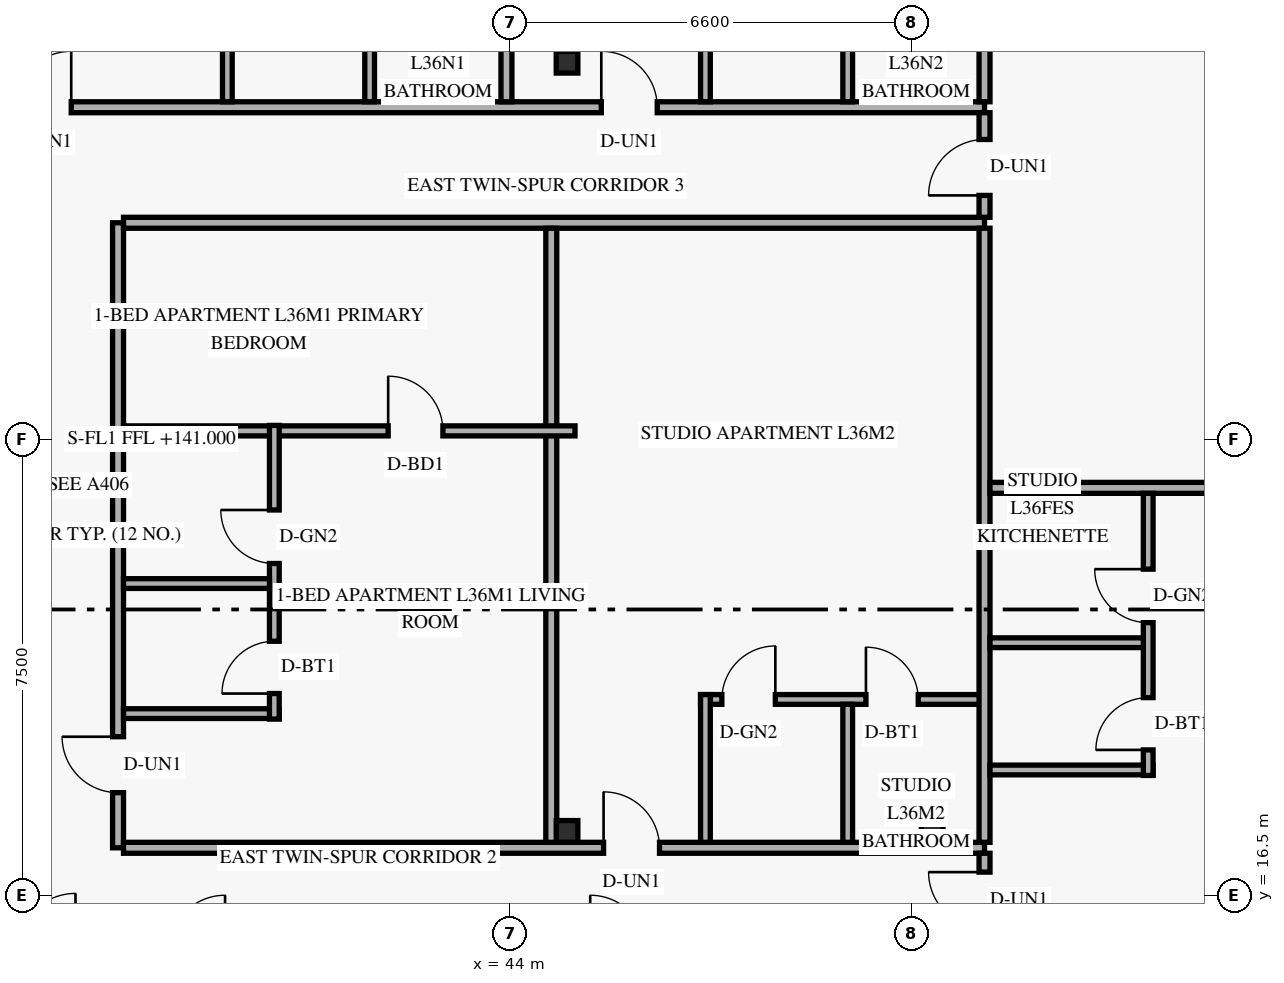
"""IFC4 building model, lengths in metres.
Left out: names, types, materials, properties, quantities, classifications, styles, units other than length and angle.
Written with IfcOpenShell. Run it as: python <this file> out.ifc"""

import sys

from ifc_helpers import new_model, si_unit, direction, frame, frame_2d, origin, origin_2d, place, context, subcontext, project, spatial, rectangle, hollow_rectangle, extrude, element, fill, save


model = new_model("IFC4")
c1 = context("Model", 3, precision=1e-05, world=origin(), true_north=direction((0.0, 1.0)))
c2 = subcontext(c1, "Body", "Model", "MODEL_VIEW")
j1 = project(units=[si_unit("LENGTHUNIT", "METRE"), si_unit("PLANEANGLEUNIT", "RADIAN")], contexts=[c1])
p1 = place(None, origin())
s1 = spatial("IfcSite", under=j1, at=p1, CompositionType="ELEMENT")
p2 = place(p1, origin())
s2 = spatial("IfcBuilding", under=s1, at=p2, CompositionType="ELEMENT")
p3 = place(p2, frame((0.0, 0.0, 141.0)))
s3 = spatial("IfcBuildingStorey", under=s2, at=p3, CompositionType="ELEMENT", Elevation=141.0)
for number, where, z_axis, x_axis in (
    (1, (44.871, 17.55, 0.0), (0.035, 0.0, 0.999), (0.0, 1.0, 0.0)),
    (2, (44.871, 30.2, 0.0), (0.035, 0.0, 0.999), (0.0, 1.0, 0.0)),
):
    element("IfcColumn", number, at=place(p3, frame(where, z_axis=z_axis, x_axis=x_axis)), inside=s3, PredefinedType="COLUMN", context=c2, shape_type="SweptSolid", body=[
        extrude(hollow_rectangle(XDim=0.356, YDim=0.356, WallThickness=0.016, at=origin_2d()), origin(), (0.0, 0.0, 1.0), 3.602),
    ])
for number, where, z_axis, x_axis in (
    (3, (50.835, 17.55, 0.0), (0.058, 0.0, 0.998), (0.0, 1.0, 0.0)),
    (4, (50.835, 30.2, 0.0), (0.058, 0.0, 0.998), (0.0, 1.0, 0.0)),
):
    element("IfcColumn", number, at=place(p3, frame(where, z_axis=z_axis, x_axis=x_axis)), inside=s3, PredefinedType="COLUMN", context=c2, shape_type="SweptSolid", body=[
        extrude(hollow_rectangle(XDim=0.356, YDim=0.356, WallThickness=0.016, at=origin_2d()), origin(), (0.0, 0.0, 1.0), 3.606),
    ])
p4 = place(p3, frame((37.55, 17.28, 0.0), z_axis=(0.0, 0.0, 1.0), x_axis=(0.0, 1.0, 0.0)))
e5 = element("IfcWall", 5, at=p4, inside=s3, PredefinedType="STANDARD", context=c2, shape_type="SweptSolid", body=[
    extrude(rectangle(XDim=10.28, YDim=0.18, at=frame_2d((5.14, 0.0))), origin(), (0.0, 0.0, 1.0), 2.73),
])
p5 = place(p4, frame((0.907, 0.0, 0.0)))
e6 = element("IfcOpeningElement", 6, at=p5, cuts=e5, PredefinedType="OPENING", context=c2, shape_type="SweptSolid", body=[
    extrude(rectangle(XDim=0.92, YDim=2.15, at=frame_2d((0.46, 1.075))), frame((0.0, 0.1, 0.0), z_axis=(0.0, -1.0, 0.0), x_axis=(1.0, 0.0, 0.0)), (0.0, 0.0, 1.0), 0.2),
])
p6 = place(p3, frame((37.64, 17.28, 0.0), z_axis=(0.0, 0.0, 1.0), x_axis=(1.0, 0.0, 0.0)))
e7 = element("IfcWall", 7, at=p6, inside=s3, PredefinedType="STANDARD", context=c2, shape_type="SweptSolid", body=[
    extrude(rectangle(XDim=14.16, YDim=0.18, at=frame_2d((7.08, 0.0))), origin(), (0.0, 0.0, 1.0), 2.73),
])
p7 = place(p6, frame((7.895, 0.0, 0.0)))
e8 = element("IfcOpeningElement", 8, at=p7, cuts=e7, PredefinedType="OPENING", context=c2, shape_type="SweptSolid", body=[
    extrude(rectangle(XDim=0.92, YDim=2.15, at=frame_2d((0.46, 1.075))), frame((0.0, 0.1, 0.0), z_axis=(0.0, -1.0, 0.0), x_axis=(1.0, 0.0, 0.0)), (0.0, 0.0, 1.0), 0.2),
])
p8 = place(p3, frame((37.64, 27.56, 0.0), z_axis=(0.0, 0.0, 1.0), x_axis=(1.0, 0.0, 0.0)))
e9 = element("IfcWall", 9, at=p8, inside=s3, PredefinedType="STANDARD", context=c2, shape_type="SweptSolid", body=[
    extrude(rectangle(XDim=14.16, YDim=0.18, at=frame_2d((7.08, 0.0))), origin(), (0.0, 0.0, 1.0), 2.73),
])
p9 = place(p3, frame((35.51, 29.46, 0.0), z_axis=(0.0, 0.0, 1.0), x_axis=(1.0, 0.0, 0.0)))
e10 = element("IfcWall", 10, at=p9, inside=s3, PredefinedType="STANDARD", context=c2, shape_type="SweptSolid", body=[
    extrude(rectangle(XDim=16.29, YDim=0.18, at=frame_2d((8.145, 0.0))), origin(), (0.0, 0.0, 1.0), 2.73),
])
p10 = place(p9, frame((0.35, 0.0, 0.0)))
e11 = element("IfcOpeningElement", 11, at=p10, cuts=e10, PredefinedType="OPENING", context=c2, shape_type="SweptSolid", body=[
    extrude(rectangle(XDim=0.92, YDim=2.15, at=frame_2d((0.46, 1.075))), frame((0.0, 0.1, 0.0), z_axis=(0.0, -1.0, 0.0), x_axis=(1.0, 0.0, 0.0)), (0.0, 0.0, 1.0), 0.2),
])
p11 = place(p9, frame((9.988, 0.0, 0.0)))
e12 = element("IfcOpeningElement", 12, at=p11, cuts=e10, PredefinedType="OPENING", context=c2, shape_type="SweptSolid", body=[
    extrude(rectangle(XDim=0.92, YDim=2.15, at=frame_2d((0.46, 1.075))), frame((0.0, 0.1, 0.0), z_axis=(0.0, -1.0, 0.0), x_axis=(1.0, 0.0, 0.0)), (0.0, 0.0, 1.0), 0.2),
])
p12 = place(p3, frame((43.938, 29.55, 0.0), z_axis=(0.0, 0.0, 1.0), x_axis=(0.0, 1.0, 0.0)))
e13 = element("IfcWall", 13, at=p12, inside=s3, PredefinedType="PARTITIONING", context=c2, shape_type="SweptSolid", body=[
    extrude(rectangle(XDim=14.17, YDim=0.18, at=frame_2d((7.085, 0.0))), origin(), (0.0, 0.0, 1.0), 2.73),
])
p13 = place(p3, frame((39.348, 29.55, 0.0), z_axis=(0.0, 0.0, 1.0), x_axis=(0.0, 1.0, 0.0)))
e14 = element("IfcWall", 14, at=p13, inside=s3, PredefinedType="PLUMBINGWALL", context=c2, shape_type="SweptSolid", body=[
    extrude(rectangle(XDim=2.76, YDim=0.16, at=frame_2d((1.38, 0.0))), origin(), (0.0, 0.0, 1.0), 2.73),
])
p14 = place(p3, frame((41.688, 29.55, 0.0), z_axis=(0.0, 0.0, 1.0), x_axis=(0.0, 1.0, 0.0)))
e15 = element("IfcWall", 15, at=p14, inside=s3, PredefinedType="PLUMBINGWALL", context=c2, shape_type="SweptSolid", body=[
    extrude(rectangle(XDim=2.6, YDim=0.16, at=frame_2d((1.3, 0.0))), origin(), (0.0, 0.0, 1.0), 2.73),
])
p15 = place(p3, frame((47.21, 29.55, 0.0), z_axis=(0.0, 0.0, 1.0), x_axis=(0.0, 1.0, 0.0)))
e16 = element("IfcWall", 16, at=p15, inside=s3, PredefinedType="PLUMBINGWALL", context=c2, shape_type="SweptSolid", body=[
    extrude(rectangle(XDim=2.76, YDim=0.16, at=frame_2d((1.38, 0.0))), origin(), (0.0, 0.0, 1.0), 2.73),
])
p16 = place(p3, frame((49.55, 29.55, 0.0), z_axis=(0.0, 0.0, 1.0), x_axis=(0.0, 1.0, 0.0)))
e17 = element("IfcWall", 17, at=p16, inside=s3, PredefinedType="PLUMBINGWALL", context=c2, shape_type="SweptSolid", body=[
    extrude(rectangle(XDim=2.6, YDim=0.16, at=frame_2d((1.3, 0.0))), origin(), (0.0, 0.0, 1.0), 2.73),
])
p17 = place(p3, frame((44.675, 17.37, 0.0), z_axis=(0.0, 0.0, 1.0), x_axis=(0.0, 1.0, 0.0)))
e18 = element("IfcWall", 18, at=p17, inside=s3, PredefinedType="PARTITIONING", context=c2, shape_type="SweptSolid", body=[
    extrude(rectangle(XDim=10.1, YDim=0.18, at=frame_2d((5.05, 0.0))), origin(), (0.0, 0.0, 1.0), 2.73),
])
p18 = place(p3, frame((37.64, 24.137, 0.0), z_axis=(0.0, 0.0, 1.0), x_axis=(1.0, 0.0, 0.0)))
e19 = element("IfcWall", 19, at=p18, inside=s3, PredefinedType="PARTITIONING", context=c2, shape_type="SweptSolid", body=[
    extrude(rectangle(XDim=7.425, YDim=0.165, at=frame_2d((3.712, 0.0))), origin(), (0.0, 0.0, 1.0), 2.73),
])
p19 = place(p18, frame((4.353, 0.0, 0.0)))
e20 = element("IfcOpeningElement", 20, at=p19, cuts=e19, PredefinedType="OPENING", context=c2, shape_type="SweptSolid", body=[
    extrude(rectangle(XDim=0.9, YDim=2.14, at=frame_2d((0.45, 1.07))), frame((0.0, 0.093, 0.0), z_axis=(0.0, -1.0, 0.0), x_axis=(1.0, 0.0, 0.0)), (0.0, 0.0, 1.0), 0.185),
])
p20 = place(p3, frame((37.64, 19.487, 0.0), z_axis=(0.0, 0.0, 1.0), x_axis=(1.0, 0.0, 0.0)))
e21 = element("IfcWall", 21, at=p20, inside=s3, PredefinedType="PLUMBINGWALL", context=c2, shape_type="SweptSolid", body=[
    extrude(rectangle(XDim=2.56, YDim=0.16, at=frame_2d((1.28, 0.0))), origin(), (0.0, 0.0, 1.0), 3.36),
])
p21 = place(p3, frame((40.12, 19.397, 0.0), z_axis=(0.0, 0.0, 1.0), x_axis=(0.0, 1.0, 0.0)))
e22 = element("IfcWall", 22, at=p21, inside=s3, PredefinedType="PLUMBINGWALL", context=c2, shape_type="SweptSolid", body=[
    extrude(rectangle(XDim=4.83, YDim=0.16, at=frame_2d((2.415, 0.0))), origin(), (0.0, 0.0, 1.0), 3.36),
])
p22 = place(p21, frame((0.42, 0.0, 0.0)))
e23 = element("IfcOpeningElement", 23, at=p22, cuts=e22, PredefinedType="OPENING", context=c2, shape_type="SweptSolid", body=[
    extrude(rectangle(XDim=0.86, YDim=2.12, at=frame_2d((0.43, 1.06))), frame((0.0, 0.09, 0.0), z_axis=(0.0, -1.0, 0.0), x_axis=(1.0, 0.0, 0.0)), (0.0, 0.0, 1.0), 0.18),
])
p23 = place(p21, frame((2.559, 0.0, 0.0)))
e24 = element("IfcOpeningElement", 24, at=p23, cuts=e22, PredefinedType="OPENING", context=c2, shape_type="SweptSolid", body=[
    extrude(rectangle(XDim=0.88, YDim=2.12, at=frame_2d((0.44, 1.06))), frame((0.0, 0.09, 0.0), z_axis=(0.0, -1.0, 0.0), x_axis=(1.0, 0.0, 0.0)), (0.0, 0.0, 1.0), 0.18),
])
p24 = place(p3, frame((37.64, 21.626, 0.0), z_axis=(0.0, 0.0, 1.0), x_axis=(1.0, 0.0, 0.0)))
e25 = element("IfcWall", 25, at=p24, inside=s3, PredefinedType="PLUMBINGWALL", context=c2, shape_type="SweptSolid", body=[
    extrude(rectangle(XDim=2.4, YDim=0.16, at=frame_2d((1.2, 0.0))), origin(), (0.0, 0.0, 1.0), 3.36),
])
p25 = place(p3, frame((47.13, 19.72, 0.0), z_axis=(0.0, 0.0, 1.0), x_axis=(1.0, 0.0, 0.0)))
e26 = element("IfcWall", 26, at=p25, inside=s3, PredefinedType="PLUMBINGWALL", context=c2, shape_type="SweptSolid", body=[
    extrude(rectangle(XDim=4.67, YDim=0.16, at=frame_2d((2.335, 0.0))), origin(), (0.0, 0.0, 1.0), 2.879),
])
p26 = place(p25, frame((0.35, 0.0, 0.0)))
e27 = element("IfcOpeningElement", 27, at=p26, cuts=e26, PredefinedType="OPENING", context=c2, shape_type="SweptSolid", body=[
    extrude(rectangle(XDim=0.88, YDim=2.12, at=frame_2d((0.44, 1.06))), frame((0.0, 0.09, 0.0), z_axis=(0.0, -1.0, 0.0), x_axis=(1.0, 0.0, 0.0)), (0.0, 0.0, 1.0), 0.18),
])
p27 = place(p25, frame((2.72, 0.0, 0.0)))
e28 = element("IfcOpeningElement", 28, at=p27, cuts=e26, PredefinedType="OPENING", context=c2, shape_type="SweptSolid", body=[
    extrude(rectangle(XDim=0.86, YDim=2.12, at=frame_2d((0.43, 1.06))), frame((0.0, 0.09, 0.0), z_axis=(0.0, -1.0, 0.0), x_axis=(1.0, 0.0, 0.0)), (0.0, 0.0, 1.0), 0.18),
])
p28 = place(p3, frame((47.21, 17.37, 0.0), z_axis=(0.0, 0.0, 1.0), x_axis=(0.0, 1.0, 0.0)))
e29 = element("IfcWall", 29, at=p28, inside=s3, PredefinedType="PLUMBINGWALL", context=c2, shape_type="SweptSolid", body=[
    extrude(rectangle(XDim=2.43, YDim=0.16, at=frame_2d((1.215, 0.0))), origin(), (0.0, 0.0, 1.0), 2.73),
])
p29 = place(p3, frame((49.55, 17.37, 0.0), z_axis=(0.0, 0.0, 1.0), x_axis=(0.0, 1.0, 0.0)))
e30 = element("IfcWall", 30, at=p29, inside=s3, PredefinedType="PLUMBINGWALL", context=c2, shape_type="SweptSolid", body=[
    extrude(rectangle(XDim=2.27, YDim=0.16, at=frame_2d((1.135, 0.0))), origin(), (0.0, 0.0, 1.0), 2.73),
])
p30 = place(p3, frame((51.8, 15.67, 0.0), z_axis=(0.0, 0.0, 1.0), x_axis=(0.0, 1.0, 0.0)))
e31 = element("IfcWall", 31, at=p30, inside=s3, PredefinedType="STANDARD", context=c2, shape_type="SweptSolid", body=[
    extrude(rectangle(XDim=1.52, YDim=0.18, at=frame_2d((0.76, 0.0))), origin(), (0.0, 0.0, 1.0), 3.36),
])
p31 = place(p30, frame((0.29, 0.0, 0.0)))
e32 = element("IfcOpeningElement", 32, at=p31, cuts=e31, PredefinedType="OPENING", context=c2, shape_type="SweptSolid", body=[
    extrude(rectangle(XDim=0.92, YDim=2.15, at=frame_2d((0.46, 1.075))), frame((0.0, 0.1, 0.0), z_axis=(0.0, -1.0, 0.0), x_axis=(1.0, 0.0, 0.0)), (0.0, 0.0, 1.0), 0.2),
])
p32 = place(p3, frame((51.8, 27.65, 0.0), z_axis=(0.0, 0.0, 1.0), x_axis=(0.0, 1.0, 0.0)))
e33 = element("IfcWall", 33, at=p32, inside=s3, PredefinedType="STANDARD", context=c2, shape_type="SweptSolid", body=[
    extrude(rectangle(XDim=1.72, YDim=0.18, at=frame_2d((0.86, 0.0))), origin(), (0.0, 0.0, 1.0), 3.36),
])
p33 = place(p32, frame((0.36, 0.0, 0.0)))
e34 = element("IfcOpeningElement", 34, at=p33, cuts=e33, PredefinedType="OPENING", context=c2, shape_type="SweptSolid", body=[
    extrude(rectangle(XDim=0.92, YDim=2.15, at=frame_2d((0.46, 1.075))), frame((0.0, 0.1, 0.0), z_axis=(0.0, -1.0, 0.0), x_axis=(1.0, 0.0, 0.0)), (0.0, 0.0, 1.0), 0.2),
])
p34 = place(p3, frame((51.8, 17.37, 0.0), z_axis=(0.0, 0.0, 1.0), x_axis=(0.0, 1.0, 0.0)))
e35 = element("IfcWall", 35, at=p34, inside=s3, PredefinedType="PARTITIONING", context=c2, shape_type="SweptSolid", body=[
    extrude(rectangle(XDim=10.1, YDim=0.18, at=frame_2d((5.05, 0.0))), origin(), (0.0, 0.0, 1.0), 3.36),
])
p35 = place(p3, frame((51.8, 29.55, 0.0), z_axis=(0.0, 0.0, 1.0), x_axis=(0.0, 1.0, 0.0)))
e36 = element("IfcWall", 36, at=p35, inside=s3, PredefinedType="PARTITIONING", context=c2, shape_type="SweptSolid", body=[
    extrude(rectangle(XDim=14.17, YDim=0.18, at=frame_2d((7.085, 0.0))), origin(), (0.0, 0.0, 1.0), 3.36),
])
p36 = place(p3, frame((51.89, 23.2, 0.0), z_axis=(0.0, 0.0, 1.0), x_axis=(1.0, 0.0, 0.0)))
e37 = element("IfcWall", 37, at=p36, inside=s3, PredefinedType="PARTITIONING", context=c2, shape_type="SweptSolid", body=[
    extrude(rectangle(XDim=6.43, YDim=0.18, at=frame_2d((3.215, 0.0))), origin(), (0.0, 0.0, 1.0), 3.36),
])
p37 = place(p3, frame((51.89, 18.56, 0.0), z_axis=(0.0, 0.0, 1.0), x_axis=(1.0, 0.0, 0.0)))
e38 = element("IfcWall", 38, at=p37, inside=s3, PredefinedType="PLUMBINGWALL", context=c2, shape_type="SweptSolid", body=[
    extrude(rectangle(XDim=2.682, YDim=0.16, at=frame_2d((1.341, 0.0))), origin(), (0.0, 0.0, 1.0), 3.36),
])
p38 = place(p3, frame((54.492, 18.47, 0.0), z_axis=(0.0, 0.0, 1.0), x_axis=(0.0, 1.0, 0.0)))
e39 = element("IfcWall", 39, at=p38, inside=s3, PredefinedType="PLUMBINGWALL", context=c2, shape_type="SweptSolid", body=[
    extrude(rectangle(XDim=4.64, YDim=0.16, at=frame_2d((2.32, 0.0))), origin(), (0.0, 0.0, 1.0), 3.36),
])
p39 = place(p38, frame((0.42, 0.0, 0.0)))
e40 = element("IfcOpeningElement", 40, at=p39, cuts=e39, PredefinedType="OPENING", context=c2, shape_type="SweptSolid", body=[
    extrude(rectangle(XDim=0.86, YDim=2.12, at=frame_2d((0.43, 1.06))), frame((0.0, 0.09, 0.0), z_axis=(0.0, -1.0, 0.0), x_axis=(1.0, 0.0, 0.0)), (0.0, 0.0, 1.0), 0.18),
])
p40 = place(p38, frame((2.513, 0.0, 0.0)))
e41 = element("IfcOpeningElement", 41, at=p40, cuts=e39, PredefinedType="OPENING", context=c2, shape_type="SweptSolid", body=[
    extrude(rectangle(XDim=0.88, YDim=2.12, at=frame_2d((0.44, 1.06))), frame((0.0, 0.09, 0.0), z_axis=(0.0, -1.0, 0.0), x_axis=(1.0, 0.0, 0.0)), (0.0, 0.0, 1.0), 0.18),
])
p41 = place(p3, frame((51.89, 20.653, 0.0), z_axis=(0.0, 0.0, 1.0), x_axis=(1.0, 0.0, 0.0)))
e42 = element("IfcWall", 42, at=p41, inside=s3, PredefinedType="PLUMBINGWALL", context=c2, shape_type="SweptSolid", body=[
    extrude(rectangle(XDim=2.522, YDim=0.16, at=frame_2d((1.261, 0.0))), origin(), (0.0, 0.0, 1.0), 3.36),
])
p42 = place(p10, origin())
e43 = element("IfcDoor", 43, at=p42, inside=s3, OperationType="SINGLE_SWING_RIGHT", PredefinedType="DOOR", context=c2, shape_type="SweptSolid", body=[
    extrude(rectangle(XDim=0.92, YDim=2.15, at=frame_2d((0.46, 1.075))), frame((0.0, 0.025, 0.0), z_axis=(0.0, -1.0, 0.0), x_axis=(1.0, 0.0, 0.0)), (0.0, 0.0, 1.0), 0.05),
])
fill(e11, e43)
p43 = place(p11, origin())
e44 = element("IfcDoor", 44, at=p43, inside=s3, OperationType="SINGLE_SWING_LEFT", PredefinedType="DOOR", context=c2, shape_type="SweptSolid", body=[
    extrude(rectangle(XDim=0.92, YDim=2.15, at=frame_2d((0.46, 1.075))), frame((0.0, 0.025, 0.0), z_axis=(0.0, -1.0, 0.0), x_axis=(1.0, 0.0, 0.0)), (0.0, 0.0, 1.0), 0.05),
])
fill(e12, e44)
p44 = place(p5, origin())
e45 = element("IfcDoor", 45, at=p44, inside=s3, OperationType="SINGLE_SWING_RIGHT", PredefinedType="DOOR", context=c2, shape_type="SweptSolid", body=[
    extrude(rectangle(XDim=0.92, YDim=2.15, at=frame_2d((0.46, 1.075))), frame((0.0, 0.025, 0.0), z_axis=(0.0, -1.0, 0.0), x_axis=(1.0, 0.0, 0.0)), (0.0, 0.0, 1.0), 0.05),
])
fill(e6, e45)
p45 = place(p22, origin())
e46 = element("IfcDoor", 46, at=p45, inside=s3, OperationType="SINGLE_SWING_LEFT", PredefinedType="DOOR", context=c2, shape_type="SweptSolid", body=[
    extrude(rectangle(XDim=0.86, YDim=2.12, at=frame_2d((0.43, 1.06))), frame((0.0, 0.025, 0.0), z_axis=(0.0, -1.0, 0.0), x_axis=(1.0, 0.0, 0.0)), (0.0, 0.0, 1.0), 0.05),
])
fill(e23, e46)
p46 = place(p23, origin())
e47 = element("IfcDoor", 47, at=p46, inside=s3, OperationType="SINGLE_SWING_RIGHT", PredefinedType="DOOR", context=c2, shape_type="SweptSolid", body=[
    extrude(rectangle(XDim=0.88, YDim=2.12, at=frame_2d((0.44, 1.06))), frame((0.0, 0.025, 0.0), z_axis=(0.0, -1.0, 0.0), x_axis=(1.0, 0.0, 0.0)), (0.0, 0.0, 1.0), 0.05),
])
fill(e24, e47)
p47 = place(p19, origin())
e48 = element("IfcDoor", 48, at=p47, inside=s3, OperationType="SINGLE_SWING_LEFT", PredefinedType="DOOR", context=c2, shape_type="SweptSolid", body=[
    extrude(rectangle(XDim=0.9, YDim=2.14, at=frame_2d((0.45, 1.07))), frame((0.0, 0.025, 0.0), z_axis=(0.0, -1.0, 0.0), x_axis=(1.0, 0.0, 0.0)), (0.0, 0.0, 1.0), 0.05),
])
fill(e20, e48)
p48 = place(p7, origin())
e49 = element("IfcDoor", 49, at=p48, inside=s3, OperationType="SINGLE_SWING_LEFT", PredefinedType="DOOR", context=c2, shape_type="SweptSolid", body=[
    extrude(rectangle(XDim=0.92, YDim=2.15, at=frame_2d((0.46, 1.075))), frame((0.0, 0.025, 0.0), z_axis=(0.0, -1.0, 0.0), x_axis=(1.0, 0.0, 0.0)), (0.0, 0.0, 1.0), 0.05),
])
fill(e8, e49)
p49 = place(p26, origin())
e50 = element("IfcDoor", 50, at=p49, inside=s3, OperationType="SINGLE_SWING_RIGHT", PredefinedType="DOOR", context=c2, shape_type="SweptSolid", body=[
    extrude(rectangle(XDim=0.88, YDim=2.12, at=frame_2d((0.44, 1.06))), frame((0.0, 0.025, 0.0), z_axis=(0.0, -1.0, 0.0), x_axis=(1.0, 0.0, 0.0)), (0.0, 0.0, 1.0), 0.05),
])
fill(e27, e50)
p50 = place(p27, origin())
e51 = element("IfcDoor", 51, at=p50, inside=s3, OperationType="SINGLE_SWING_LEFT", PredefinedType="DOOR", context=c2, shape_type="SweptSolid", body=[
    extrude(rectangle(XDim=0.86, YDim=2.12, at=frame_2d((0.43, 1.06))), frame((0.0, 0.025, 0.0), z_axis=(0.0, -1.0, 0.0), x_axis=(1.0, 0.0, 0.0)), (0.0, 0.0, 1.0), 0.05),
])
fill(e28, e51)
p51 = place(p31, origin())
e52 = element("IfcDoor", 52, at=p51, inside=s3, OperationType="SINGLE_SWING_RIGHT", PredefinedType="DOOR", context=c2, shape_type="SweptSolid", body=[
    extrude(rectangle(XDim=0.92, YDim=2.15, at=frame_2d((0.46, 1.075))), frame((0.0, 0.025, 0.0), z_axis=(0.0, -1.0, 0.0), x_axis=(1.0, 0.0, 0.0)), (0.0, 0.0, 1.0), 0.05),
])
fill(e32, e52)
p52 = place(p39, origin())
e53 = element("IfcDoor", 53, at=p52, inside=s3, OperationType="SINGLE_SWING_LEFT", PredefinedType="DOOR", context=c2, shape_type="SweptSolid", body=[
    extrude(rectangle(XDim=0.86, YDim=2.12, at=frame_2d((0.43, 1.06))), frame((0.0, 0.025, 0.0), z_axis=(0.0, -1.0, 0.0), x_axis=(1.0, 0.0, 0.0)), (0.0, 0.0, 1.0), 0.05),
])
fill(e40, e53)
p53 = place(p40, origin())
e54 = element("IfcDoor", 54, at=p53, inside=s3, OperationType="SINGLE_SWING_RIGHT", PredefinedType="DOOR", context=c2, shape_type="SweptSolid", body=[
    extrude(rectangle(XDim=0.88, YDim=2.12, at=frame_2d((0.44, 1.06))), frame((0.0, 0.025, 0.0), z_axis=(0.0, -1.0, 0.0), x_axis=(1.0, 0.0, 0.0)), (0.0, 0.0, 1.0), 0.05),
])
fill(e41, e54)
p54 = place(p33, origin())
e55 = element("IfcDoor", 55, at=p54, inside=s3, OperationType="SINGLE_SWING_LEFT", PredefinedType="DOOR", context=c2, shape_type="SweptSolid", body=[
    extrude(rectangle(XDim=0.92, YDim=2.15, at=frame_2d((0.46, 1.075))), frame((0.0, 0.025, 0.0), z_axis=(0.0, -1.0, 0.0), x_axis=(1.0, 0.0, 0.0)), (0.0, 0.0, 1.0), 0.05),
])
fill(e34, e55)
save(model, sys.argv[1])
